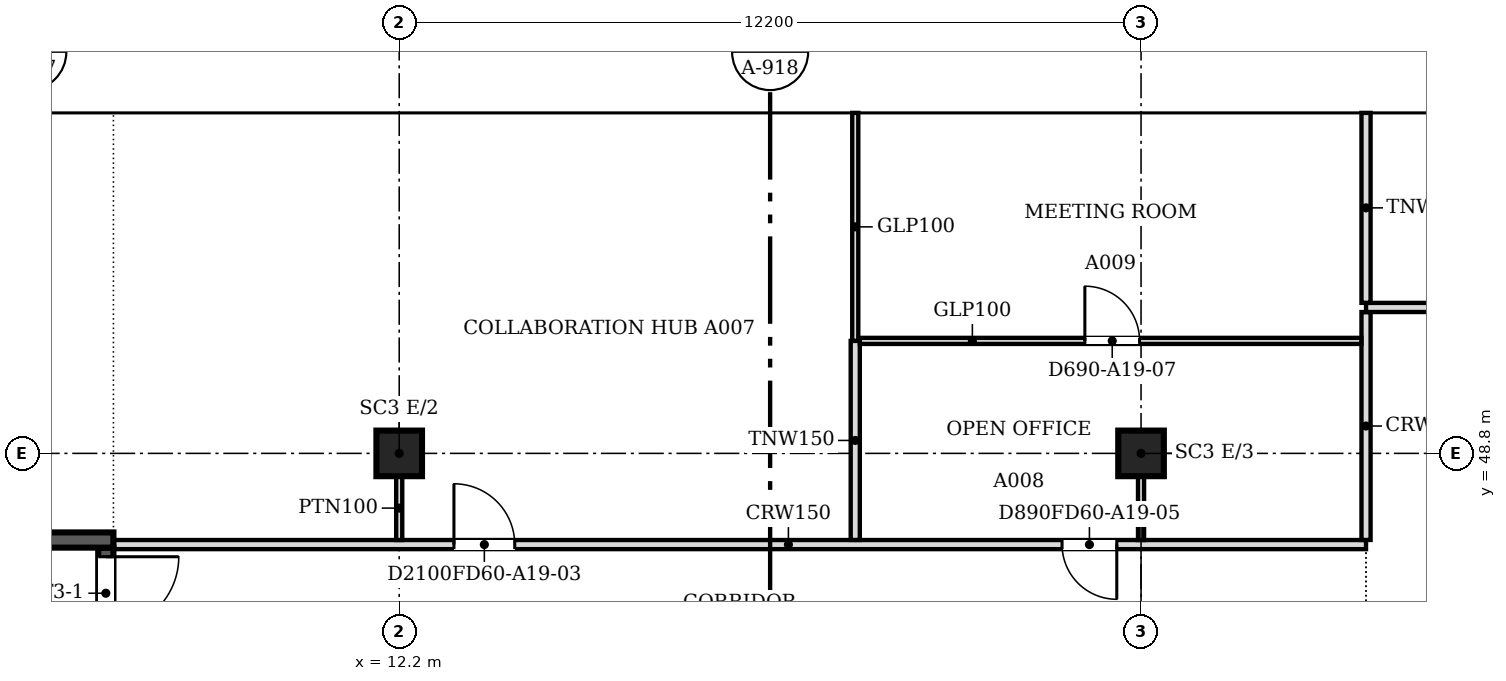
"""IFC4 building model, lengths in metres.
Left out: names, types, materials, properties, quantities, classifications, styles, units other than length and angle.
Written with IfcOpenShell. Run it as: python <this file> out.ifc"""

import sys

from ifc_helpers import new_model, si_unit, direction, frame, frame_2d, origin, origin_2d, place, context, subcontext, project, spatial, polyline, rectangle, outline, extrude, faceted_brep, source, transform, mapped, element, fill, save


model = new_model("IFC4")
c1 = context("Model", 3, precision=1e-05, world=origin(), true_north=direction((0.0, 1.0)))
c2 = subcontext(c1, "Body", "Model", "MODEL_VIEW")
j1 = project(units=[si_unit("LENGTHUNIT", "METRE"), si_unit("PLANEANGLEUNIT", "RADIAN")], contexts=[c1])
p1 = place(None, origin())
s1 = spatial("IfcSite", under=j1, at=p1, CompositionType="ELEMENT")
p2 = place(p1, origin())
s2 = spatial("IfcBuilding", under=s1, at=p2, CompositionType="ELEMENT")
p3 = place(p2, frame((0.0, 0.0, 216.9)))
s3 = spatial("IfcBuildingStorey", under=s2, at=p3, CompositionType="ELEMENT", Elevation=216.9)
for number, where, z_axis, x_axis in (
    (1, (12.2, 48.8, 0.0), (0.0, 0.0, 1.0), (1.0, 0.0, 0.0)),
    (2, (24.4, 48.8, 0.0), (0.0, 0.0, 1.0), (1.0, 0.0, 0.0)),
):
    element("IfcColumn", number, at=place(p3, frame(where, z_axis=z_axis, x_axis=x_axis)), inside=s3, PredefinedType="COLUMN", context=c2, shape_type="SweptSolid", body=[
        extrude(rectangle(XDim=0.75, YDim=0.75, at=origin_2d()), origin(), (0.0, 0.0, 1.0), 3.6),
    ])
m1 = source(origin(), c2, "Body", "SweptSolid", [
    extrude(outline(polyline([(3.05, 0.0), (6.1, 3.8), (3.05, 7.6), (0.0, 3.8), (3.05, 0.0)])), frame((0.0, 0.25, 0.0), z_axis=(0.0, -1.0, 0.0), x_axis=(1.0, 0.0, 0.0)), (0.0, 0.0, 1.0), 0.5),
])
p4 = place(p3, frame((30.5, 54.65, -3.8), z_axis=(0.0, 0.0, 1.0), x_axis=(-1.0, 0.0, 0.0)))
e3 = element("IfcWall", 3, at=p4, inside=s3, PredefinedType="SOLIDWALL", context=c2, shape_type="MappedRepresentation", body=[
    mapped(m1, transform((0.0, 0.0, 0.0), scale=1.0)),
])
m2 = source(origin(), c2, "Body", "SweptSolid", [
    extrude(outline(polyline([(3.05, 0.399), (5.78, 3.8), (3.05, 7.2), (0.321, 3.8), (3.05, 0.399)])), frame((0.0, 0.26, 0.0), z_axis=(0.0, -1.0, 0.0), x_axis=(1.0, 0.0, 0.0)), (0.0, 0.0, 1.0), 0.52),
])
p5 = place(p4, origin())
e4 = element("IfcOpeningElement", 4, at=p5, cuts=e3, PredefinedType="OPENING", context=c2, shape_type="MappedRepresentation", body=[
    mapped(m2, transform((0.0, 0.0, 0.0), scale=1.0)),
])
m3 = source(origin(), c2, "Body", "Brep", [
    faceted_brep([(3.05, -0.25, 0.0), (6.1, -0.25, 3.8), (6.1, -0.25, 3.8), (3.05, -0.25, 7.6), (0.0, -0.25, 3.8), (0.0, 0.25, 3.8), (3.05, 0.25, 7.6), (6.1, 0.25, 3.8), (6.1, 0.25, 3.8), (3.05, 0.25, 0.0)], [[[0, 1, 2, 3, 4]], [[5, 6, 7, 8, 9]], [[9, 8, 1, 0]], [[7, 6, 3, 2]], [[6, 5, 4, 3]], [[5, 9, 0, 4]], [[1, 8, 7, 2]]]),
])
p6 = place(p3, frame((24.4, 54.65, -3.8), z_axis=(0.0, 0.0, 1.0), x_axis=(-1.0, 0.0, 0.0)))
e5 = element("IfcWall", 5, at=p6, inside=s3, PredefinedType="SOLIDWALL", context=c2, shape_type="MappedRepresentation", body=[
    mapped(m3, transform((0.0, 0.0, 0.0), scale=1.0)),
])
p7 = place(p6, origin())
e6 = element("IfcOpeningElement", 6, at=p7, cuts=e5, PredefinedType="OPENING", context=c2, shape_type="MappedRepresentation", body=[
    mapped(m2, transform((0.0, 0.0, 0.0), scale=1.0)),
])
p8 = place(p3, frame((18.3, 54.65, -3.8), z_axis=(0.0, 0.0, 1.0), x_axis=(-1.0, 0.0, 0.0)))
e7 = element("IfcWall", 7, at=p8, inside=s3, PredefinedType="SOLIDWALL", context=c2, shape_type="MappedRepresentation", body=[
    mapped(m1, transform((0.0, 0.0, 0.0), scale=1.0)),
])
p9 = place(p8, origin())
e8 = element("IfcOpeningElement", 8, at=p9, cuts=e7, PredefinedType="OPENING", context=c2, shape_type="MappedRepresentation", body=[
    mapped(m2, transform((0.0, 0.0, 0.0), scale=1.0)),
])
m4 = source(origin(), c2, "Body", "Brep", [
    faceted_brep([(3.05, -0.25, 0.0), (6.053, -0.25, 3.8), (3.05, -0.25, 7.6), (0.0, -0.25, 3.8), (0.0, 0.25, 3.8), (3.05, 0.25, 7.6), (6.007, 0.25, 3.859), (6.007, 0.25, 3.741), (3.05, 0.25, 0.0), (6.053, 0.0, 3.8)], [[[0, 1, 2, 3]], [[4, 5, 6, 7, 8]], [[8, 7, 9, 1, 0]], [[6, 5, 2, 1, 9]], [[5, 4, 3, 2]], [[4, 8, 0, 3]], [[9, 7, 6]]]),
])
p10 = place(p3, frame((12.2, 54.65, -3.8), z_axis=(0.0, 0.0, 1.0), x_axis=(-1.0, 0.0, 0.0)))
e9 = element("IfcWall", 9, at=p10, inside=s3, PredefinedType="SOLIDWALL", context=c2, shape_type="MappedRepresentation", body=[
    mapped(m4, transform((0.0, 0.0, 0.0), scale=1.0)),
])
m5 = source(origin(), c2, "Body", "SweptSolid", [
    extrude(outline(polyline([(3.049, 0.401), (5.735, 3.8), (3.049, 7.199), (0.321, 3.8), (3.049, 0.401)])), frame((0.0, 0.26, 0.0), z_axis=(0.0, -1.0, 0.0), x_axis=(1.0, 0.0, 0.0)), (0.0, 0.0, 1.0), 0.52),
])
p11 = place(p10, origin())
e10 = element("IfcOpeningElement", 10, at=p11, cuts=e9, PredefinedType="OPENING", context=c2, shape_type="MappedRepresentation", body=[
    mapped(m5, transform((0.0, 0.0, 0.0), scale=1.0)),
])
p12 = place(p2, frame((0.0, 0.0, 220.7)))
s4 = spatial("IfcBuildingStorey", under=s2, at=p12, CompositionType="ELEMENT", Elevation=220.7)
m6 = source(origin(), c2, "Body", "SweptSolid", [
    extrude(outline(polyline([(3.05, 0.0), (6.1, 3.8), (3.05, 7.6), (0.0, 3.8), (3.05, 0.0)])), frame((0.0, 0.25, 0.0), z_axis=(0.0, -1.0, 0.0), x_axis=(1.0, 0.0, 0.0)), (0.0, 0.0, 1.0), 0.5),
])
p13 = place(p12, frame((33.55, 54.65, -3.8), z_axis=(0.0, 0.0, 1.0), x_axis=(-1.0, 0.0, 0.0)))
e11 = element("IfcWall", 11, at=p13, inside=s4, PredefinedType="SOLIDWALL", context=c2, shape_type="MappedRepresentation", body=[
    mapped(m6, transform((0.0, 0.0, 0.0), scale=1.0)),
])
m7 = source(origin(), c2, "Body", "SweptSolid", [
    extrude(outline(polyline([(3.05, 0.399), (5.78, 3.8), (3.05, 7.201), (0.321, 3.8), (3.05, 0.399)])), frame((0.0, 0.26, 0.0), z_axis=(0.0, -1.0, 0.0), x_axis=(1.0, 0.0, 0.0)), (0.0, 0.0, 1.0), 0.52),
])
p14 = place(p13, origin())
e12 = element("IfcOpeningElement", 12, at=p14, cuts=e11, PredefinedType="OPENING", context=c2, shape_type="MappedRepresentation", body=[
    mapped(m7, transform((0.0, 0.0, 0.0), scale=1.0)),
])
m8 = source(origin(), c2, "Body", "Brep", [
    faceted_brep([(3.05, -0.25, 0.0), (6.1, -0.25, 3.8), (6.1, -0.25, 3.8), (3.05, -0.25, 7.6), (0.0, -0.25, 3.8), (0.0, 0.25, 3.8), (3.05, 0.25, 7.6), (6.1, 0.25, 3.8), (6.1, 0.25, 3.8), (3.05, 0.25, 0.0)], [[[0, 1, 2, 3, 4]], [[5, 6, 7, 8, 9]], [[9, 8, 1, 0]], [[7, 6, 3, 2]], [[6, 5, 4, 3]], [[5, 9, 0, 4]], [[1, 8, 7, 2]]]),
])
p15 = place(p12, frame((27.45, 54.65, -3.8), z_axis=(0.0, 0.0, 1.0), x_axis=(-1.0, 0.0, 0.0)))
e13 = element("IfcWall", 13, at=p15, inside=s4, PredefinedType="SOLIDWALL", context=c2, shape_type="MappedRepresentation", body=[
    mapped(m8, transform((0.0, 0.0, 0.0), scale=1.0)),
])
p16 = place(p15, origin())
e14 = element("IfcOpeningElement", 14, at=p16, cuts=e13, PredefinedType="OPENING", context=c2, shape_type="MappedRepresentation", body=[
    mapped(m7, transform((0.0, 0.0, 0.0), scale=1.0)),
])
p17 = place(p12, frame((21.35, 54.65, -3.8), z_axis=(0.0, 0.0, 1.0), x_axis=(-1.0, 0.0, 0.0)))
e15 = element("IfcWall", 15, at=p17, inside=s4, PredefinedType="SOLIDWALL", context=c2, shape_type="MappedRepresentation", body=[
    mapped(m6, transform((0.0, 0.0, 0.0), scale=1.0)),
])
p18 = place(p17, origin())
e16 = element("IfcOpeningElement", 16, at=p18, cuts=e15, PredefinedType="OPENING", context=c2, shape_type="MappedRepresentation", body=[
    mapped(m7, transform((0.0, 0.0, 0.0), scale=1.0)),
])
p19 = place(p12, frame((15.25, 54.65, -3.8), z_axis=(0.0, 0.0, 1.0), x_axis=(-1.0, 0.0, 0.0)))
e17 = element("IfcWall", 17, at=p19, inside=s4, PredefinedType="SOLIDWALL", context=c2, shape_type="MappedRepresentation", body=[
    mapped(m6, transform((0.0, 0.0, 0.0), scale=1.0)),
])
p20 = place(p19, origin())
e18 = element("IfcOpeningElement", 18, at=p20, cuts=e17, PredefinedType="OPENING", context=c2, shape_type="MappedRepresentation", body=[
    mapped(m7, transform((0.0, 0.0, 0.0), scale=1.0)),
])
m9 = source(origin(), c2, "Body", "Brep", [
    faceted_brep([(3.003, -0.25, 0.0), (3.05, -0.25, 0.06), (3.05, -0.25, 7.54), (3.003, -0.25, 7.6), (0.0, -0.25, 3.8), (0.0, 0.25, 3.8), (2.957, 0.25, 7.541), (2.957, 0.25, 0.059), (3.003, 0.0, 0.0), (3.003, 0.0, 7.6)], [[[0, 1, 2, 3, 4]], [[5, 6, 7]], [[1, 0, 8]], [[9, 3, 2]], [[6, 5, 4, 3, 9]], [[5, 7, 8, 0, 4]], [[1, 8, 7, 6, 9, 2]]]),
])
p21 = place(p12, frame((9.15, 54.65, -3.8), z_axis=(0.0, 0.0, 1.0), x_axis=(-1.0, 0.0, 0.0)))
e19 = element("IfcWall", 19, at=p21, inside=s4, PredefinedType="SOLIDWALL", context=c2, shape_type="MappedRepresentation", body=[
    mapped(m9, transform((0.0, 0.0, 0.0), scale=1.0)),
])
m10 = source(origin(), c2, "Body", "SweptSolid", [
    extrude(outline(polyline([(2.803, 6.944), (0.319, 3.8), (2.803, 0.656), (2.803, 6.944)])), frame((0.0, 0.26, 0.0), z_axis=(0.0, -1.0, 0.0), x_axis=(1.0, 0.0, 0.0)), (0.0, 0.0, 1.0), 0.52),
])
p22 = place(p21, origin())
e20 = element("IfcOpeningElement", 20, at=p22, cuts=e19, PredefinedType="OPENING", context=c2, shape_type="MappedRepresentation", body=[
    mapped(m10, transform((0.0, 0.0, 0.0), scale=1.0)),
])
p23 = place(p3, frame((3.6, 47.375, 0.0), z_axis=(0.0, 0.0, 1.0), x_axis=(1.0, 0.0, 0.0)))
e21 = element("IfcWall", 21, at=p23, inside=s3, PredefinedType="SOLIDWALL", context=c2, shape_type="SweptSolid", body=[
    extrude(rectangle(XDim=3.9, YDim=0.25, at=frame_2d((1.95, 0.0))), origin(), (0.0, 0.0, 1.0), 3.8),
])
p24 = place(p3, frame((7.375, 47.25, 0.0), z_axis=(0.0, 0.0, 1.0), x_axis=(0.0, -1.0, 0.0)))
e22 = element("IfcWall", 22, at=p24, inside=s3, PredefinedType="SOLIDWALL", context=c2, shape_type="SweptSolid", body=[
    extrude(rectangle(XDim=8.0, YDim=0.25, at=frame_2d((4.0, 0.0))), origin(), (0.0, 0.0, 1.0), 3.8),
])
m11 = source(origin(), c2, "Body", "SweptSolid", [
    extrude(rectangle(XDim=1.2, YDim=2.1, at=frame_2d((0.6, 1.05))), frame((0.0, 0.135, 0.0), z_axis=(0.0, -1.0, 0.0), x_axis=(1.0, 0.0, 0.0)), (0.0, 0.0, 1.0), 0.27),
])
p25 = place(p24, frame((0.15, 0.0, 0.0)))
e23 = element("IfcOpeningElement", 23, at=p25, cuts=e22, PredefinedType="OPENING", context=c2, shape_type="MappedRepresentation", body=[
    mapped(m11, transform((0.0, 0.0, 0.0), scale=1.0)),
])
p26 = place(p3, frame((7.5, 47.3, 0.0), z_axis=(0.0, 0.0, 1.0), x_axis=(1.0, 0.0, 0.0)))
e24 = element("IfcWall", 24, at=p26, inside=s3, PredefinedType="PARTITIONING", context=c2, shape_type="SweptSolid", body=[
    extrude(rectangle(XDim=20.6, YDim=0.15, at=frame_2d((10.3, 0.0))), origin(), (0.0, 0.0, 1.0), 3.067),
])
m12 = source(origin(), c2, "Body", "SweptSolid", [
    extrude(rectangle(XDim=0.9, YDim=2.1, at=frame_2d((0.45, 1.05))), frame((0.0, 0.085, 0.0), z_axis=(0.0, -1.0, 0.0), x_axis=(1.0, 0.0, 0.0)), (0.0, 0.0, 1.0), 0.17),
])
p27 = place(p26, frame((15.601, 0.0, 0.0)))
e25 = element("IfcOpeningElement", 25, at=p27, cuts=e24, PredefinedType="OPENING", context=c2, shape_type="MappedRepresentation", body=[
    mapped(m12, transform((0.0, 0.0, 0.0), scale=1.0)),
])
m13 = source(origin(), c2, "Body", "SweptSolid", [
    extrude(rectangle(XDim=1.0, YDim=2.1, at=frame_2d((0.5, 1.05))), frame((0.0, 0.085, 0.0), z_axis=(0.0, -1.0, 0.0), x_axis=(1.0, 0.0, 0.0)), (0.0, 0.0, 1.0), 0.17),
])
p28 = place(p26, frame((5.6, 0.0, 0.0)))
e26 = element("IfcOpeningElement", 26, at=p28, cuts=e24, PredefinedType="OPENING", context=c2, shape_type="MappedRepresentation", body=[
    mapped(m13, transform((0.0, 0.0, 0.0), scale=1.0)),
])
p29 = place(p3, frame((19.7, 47.376, 0.0), z_axis=(0.0, 0.0, 1.0), x_axis=(0.0, 1.0, 0.0)))
e27 = element("IfcWall", 27, at=p29, inside=s3, PredefinedType="PARTITIONING", context=c2, shape_type="SweptSolid", body=[
    extrude(rectangle(XDim=3.274, YDim=0.15, at=frame_2d((1.637, 0.0))), origin(), (0.0, 0.0, 1.0), 3.067),
])
p30 = place(p3, frame((28.1, 47.376, 0.0), z_axis=(0.0, 0.0, 1.0), x_axis=(0.0, 1.0, 0.0)))
e28 = element("IfcWall", 28, at=p30, inside=s3, PredefinedType="PARTITIONING", context=c2, shape_type="SweptSolid", body=[
    extrude(rectangle(XDim=3.748, YDim=0.15, at=frame_2d((1.874, 0.0))), origin(), (0.0, 0.0, 1.0), 3.067),
])
for number, where, z_axis, x_axis in (
    (29, (12.2, 48.425, 0.0), (0.0, 0.0, 1.0), (0.0, -1.0, 0.0)),
    (30, (24.4, 48.425, 0.0), (0.0, 0.0, 1.0), (0.0, -1.0, 0.0)),
):
    element("IfcWall", number, at=place(p3, frame(where, z_axis=z_axis, x_axis=x_axis)), inside=s3, PredefinedType="PARTITIONING", context=c2, shape_type="SweptSolid", body=[
        extrude(rectangle(XDim=1.05, YDim=0.1, at=frame_2d((0.525, 0.0))), origin(), (0.0, 0.0, 1.0), 3.067),
    ])
p31 = place(p3, frame((19.7, 50.651, 0.0), z_axis=(0.0, 0.0, 1.0), x_axis=(0.0, 1.0, 0.0)))
e31 = element("IfcWall", 31, at=p31, inside=s3, PredefinedType="PARTITIONING", context=c2, shape_type="SweptSolid", body=[
    extrude(rectangle(XDim=3.749, YDim=0.1, at=frame_2d((1.875, 0.0))), origin(), (0.0, 0.0, 1.0), 3.067),
])
p32 = place(p3, frame((19.776, 50.65, 0.0), z_axis=(0.0, 0.0, 1.0), x_axis=(1.0, 0.0, 0.0)))
e32 = element("IfcWall", 32, at=p32, inside=s3, PredefinedType="PARTITIONING", context=c2, shape_type="SweptSolid", body=[
    extrude(rectangle(XDim=8.248, YDim=0.1, at=frame_2d((4.124, 0.0))), origin(), (0.0, 0.0, 1.0), 3.067),
])
m14 = source(origin(), c2, "Body", "SweptSolid", [
    extrude(rectangle(XDim=0.9, YDim=2.1, at=frame_2d((0.45, 1.05))), frame((0.0, 0.06, 0.0), z_axis=(0.0, -1.0, 0.0), x_axis=(1.0, 0.0, 0.0)), (0.0, 0.0, 1.0), 0.12),
])
p33 = place(p32, frame((3.7, 0.0, 0.0)))
e33 = element("IfcOpeningElement", 33, at=p33, cuts=e32, PredefinedType="OPENING", context=c2, shape_type="MappedRepresentation", body=[
    mapped(m14, transform((0.0, 0.0, 0.0), scale=1.0)),
])
p34 = place(p3, frame((28.1, 51.2, 0.0), z_axis=(0.0, 0.0, 1.0), x_axis=(1.0, 0.0, 0.0)))
e34 = element("IfcWall", 34, at=p34, inside=s3, PredefinedType="PARTITIONING", context=c2, shape_type="SweptSolid", body=[
    extrude(rectangle(XDim=31.438, YDim=0.15, at=frame_2d((15.719, 0.0))), origin(), (0.0, 0.0, 1.0), 3.067),
])
p35 = place(p34, frame((27.501, 0.0, 0.0)))
e35 = element("IfcOpeningElement", 35, at=p35, cuts=e34, PredefinedType="OPENING", context=c2, shape_type="MappedRepresentation", body=[
    mapped(m12, transform((0.0, 0.0, 0.0), scale=1.0)),
])
p36 = place(p34, frame((5.6, 0.0, 0.0)))
e36 = element("IfcOpeningElement", 36, at=p36, cuts=e34, PredefinedType="OPENING", context=c2, shape_type="MappedRepresentation", body=[
    mapped(m12, transform((0.0, 0.0, 0.0), scale=1.0)),
])
p37 = place(p34, frame((17.8, 0.0, 0.0)))
e37 = element("IfcOpeningElement", 37, at=p37, cuts=e34, PredefinedType="OPENING", context=c2, shape_type="MappedRepresentation", body=[
    mapped(m12, transform((0.0, 0.0, 0.0), scale=1.0)),
])
p38 = place(p3, frame((28.1, 51.276, 0.0), z_axis=(0.0, 0.0, 1.0), x_axis=(0.0, 1.0, 0.0)))
e38 = element("IfcWall", 38, at=p38, inside=s3, PredefinedType="PARTITIONING", context=c2, shape_type="SweptSolid", body=[
    extrude(rectangle(XDim=3.124, YDim=0.15, at=frame_2d((1.562, 0.0))), origin(), (0.0, 0.0, 1.0), 3.067),
])
m15 = source(origin(), c2, "Body", "SweptSolid", [
    extrude(rectangle(XDim=1.2, YDim=2.1, at=frame_2d((0.6, 1.05))), frame((0.0, 0.025, 0.0), z_axis=(0.0, -1.0, 0.0), x_axis=(1.0, 0.0, 0.0)), (0.0, 0.0, 1.0), 0.05),
])
p39 = place(p25, origin())
e39 = element("IfcDoor", 39, at=p39, inside=s3, OperationType="SINGLE_SWING_LEFT", PredefinedType="DOOR", context=c2, shape_type="MappedRepresentation", body=[
    mapped(m15, transform((0.0, 0.0, 0.0), scale=1.0)),
])
fill(e23, e39)
m16 = source(origin(), c2, "Body", "SweptSolid", [
    extrude(rectangle(XDim=0.9, YDim=2.1, at=frame_2d((0.45, 1.05))), frame((0.0, 0.025, 0.0), z_axis=(0.0, -1.0, 0.0), x_axis=(1.0, 0.0, 0.0)), (0.0, 0.0, 1.0), 0.05),
])
p40 = place(p33, origin())
e40 = element("IfcDoor", 40, at=p40, inside=s3, OperationType="SINGLE_SWING_LEFT", PredefinedType="DOOR", context=c2, shape_type="MappedRepresentation", body=[
    mapped(m16, transform((0.0, 0.0, 0.0), scale=1.0)),
])
fill(e33, e40)
p41 = place(p27, origin())
e41 = element("IfcDoor", 41, at=p41, inside=s3, OperationType="SINGLE_SWING_RIGHT", PredefinedType="DOOR", context=c2, shape_type="MappedRepresentation", body=[
    mapped(m16, transform((0.0, 0.0, 0.0), scale=1.0)),
])
fill(e25, e41)
m17 = source(origin(), c2, "Body", "SweptSolid", [
    extrude(rectangle(XDim=1.0, YDim=2.1, at=frame_2d((0.5, 1.05))), frame((0.0, 0.025, 0.0), z_axis=(0.0, -1.0, 0.0), x_axis=(1.0, 0.0, 0.0)), (0.0, 0.0, 1.0), 0.05),
])
p42 = place(p28, origin())
e42 = element("IfcDoor", 42, at=p42, inside=s3, OperationType="SINGLE_SWING_LEFT", PredefinedType="DOOR", context=c2, shape_type="MappedRepresentation", body=[
    mapped(m17, transform((0.0, 0.0, 0.0), scale=1.0)),
])
fill(e26, e42)
save(model, sys.argv[1])
